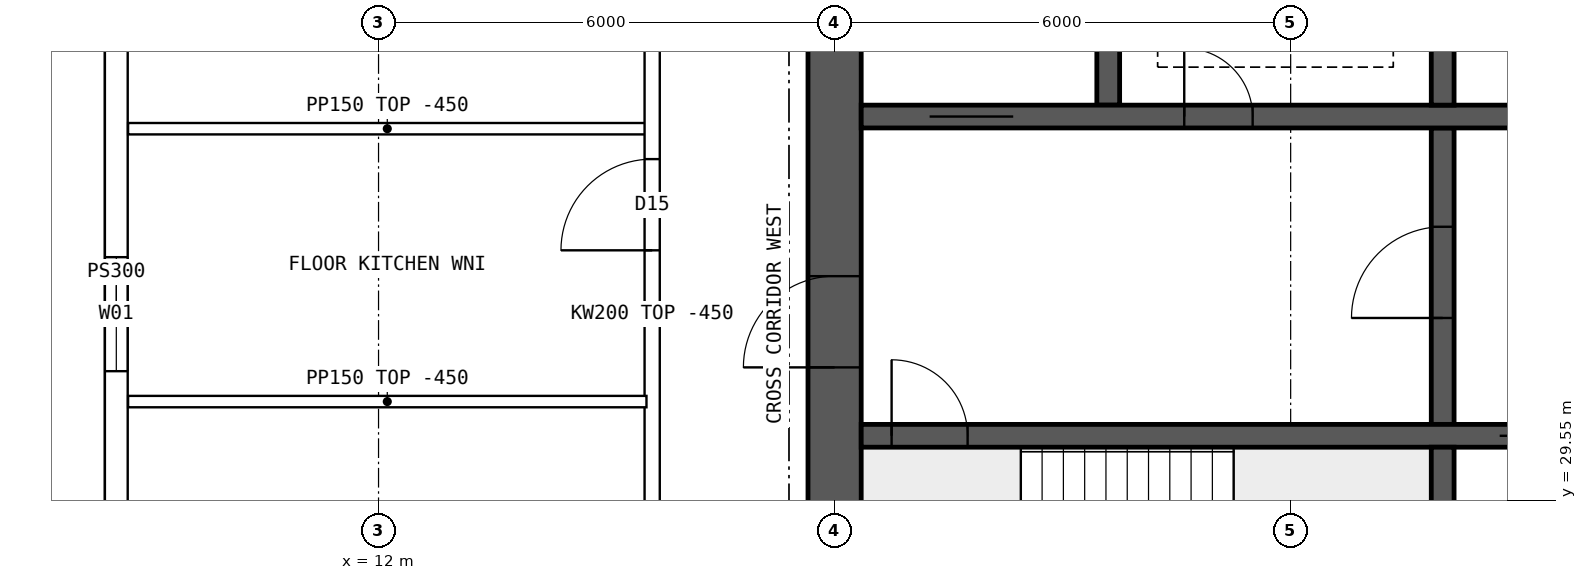
"""IFC4 building model, lengths in metres.
Left out: names, types, materials, properties, quantities, classifications, styles, units other than length and angle.
Written with IfcOpenShell. Run it as: python <this file> out.ifc"""

import sys

from ifc_helpers import new_model, si_unit, direction, frame, frame_2d, origin, place, context, subcontext, project, spatial, polyline, rectangle, outline, extrude, element, fill, save


model = new_model("IFC4")
c1 = context("Model", 3, precision=1e-05, world=origin(), true_north=direction((0.0, 1.0)))
c2 = subcontext(c1, "Body", "Model", "MODEL_VIEW")
j1 = project(units=[si_unit("LENGTHUNIT", "METRE"), si_unit("PLANEANGLEUNIT", "RADIAN")], contexts=[c1])
p1 = place(None, origin())
s1 = spatial("IfcSite", under=j1, at=p1, CompositionType="ELEMENT")
p2 = place(p1, origin())
s2 = spatial("IfcBuilding", under=s1, at=p2, CompositionType="ELEMENT")
p3 = place(p2, frame((0.0, 0.0, 242.8)))
s3 = spatial("IfcBuildingStorey", under=s2, at=p3, CompositionType="ELEMENT", Elevation=242.8)
p4 = place(p3, frame((18.0, 26.15, 0.0), z_axis=(0.0, 0.0, 1.0), x_axis=(0.0, 1.0, 0.0)))
e1 = element("IfcWall", 1, at=p4, inside=s3, PredefinedType="SHEAR", context=c2, shape_type="SweptSolid", body=[
    extrude(rectangle(XDim=11.7, YDim=0.7, at=frame_2d((5.85, 0.0))), origin(), (0.0, 0.0, 1.0), 3.75),
])
p5 = place(p4, frame((5.15, 0.0, 0.0)))
e2 = element("IfcOpeningElement", 2, at=p5, cuts=e1, PredefinedType="OPENING", context=c2, shape_type="SweptSolid", body=[
    extrude(rectangle(XDim=1.2, YDim=2.1, at=frame_2d((0.6, 1.05))), frame((0.0, 0.36, 0.0), z_axis=(0.0, -1.0, 0.0), x_axis=(1.0, 0.0, 0.0)), (0.0, 0.0, 1.0), 0.72),
])
p6 = place(p3, frame((18.35, 30.4, 0.0), z_axis=(0.0, 0.0, 1.0), x_axis=(1.0, 0.0, 0.0)))
e3 = element("IfcWall", 3, at=p6, inside=s3, PredefinedType="SHEAR", context=c2, shape_type="SweptSolid", body=[
    extrude(rectangle(XDim=47.3, YDim=0.3, at=frame_2d((23.65, 0.0))), origin(), (0.0, 0.0, 1.0), 3.75),
])
p7 = place(p6, frame((0.4, 0.0, 0.0)))
e4 = element("IfcOpeningElement", 4, at=p7, cuts=e3, PredefinedType="OPENING", context=c2, shape_type="SweptSolid", body=[
    extrude(rectangle(XDim=1.0, YDim=2.1, at=frame_2d((0.5, 1.05))), frame((0.0, 0.16, 0.0), z_axis=(0.0, -1.0, 0.0), x_axis=(1.0, 0.0, 0.0)), (0.0, 0.0, 1.0), 0.32),
])
p8 = place(p6, frame((45.9, 0.0, 0.0)))
e5 = element("IfcOpeningElement", 5, at=p8, cuts=e3, PredefinedType="OPENING", context=c2, shape_type="SweptSolid", body=[
    extrude(rectangle(XDim=1.0, YDim=2.1, at=frame_2d((0.5, 1.05))), frame((0.0, 0.16, 0.0), z_axis=(0.0, -1.0, 0.0), x_axis=(1.0, 0.0, 0.0)), (0.0, 0.0, 1.0), 0.32),
])
p9 = place(p6, frame((8.4, 0.0, 0.0)))
e6 = element("IfcOpeningElement", 6, at=p9, cuts=e3, PredefinedType="OPENING", context=c2, shape_type="SweptSolid", body=[
    extrude(rectangle(XDim=1.1, YDim=2.1, at=frame_2d((0.55, 1.05))), frame((0.0, 0.16, 0.0), z_axis=(0.0, -1.0, 0.0), x_axis=(1.0, 0.0, 0.0)), (0.0, 0.0, 1.0), 0.32),
])
p10 = place(p6, frame((11.0, 0.0, 0.0)))
e7 = element("IfcOpeningElement", 7, at=p10, cuts=e3, PredefinedType="OPENING", context=c2, shape_type="SweptSolid", body=[
    extrude(rectangle(XDim=1.1, YDim=2.1, at=frame_2d((0.55, 1.05))), frame((0.0, 0.16, 0.0), z_axis=(0.0, -1.0, 0.0), x_axis=(1.0, 0.0, 0.0)), (0.0, 0.0, 1.0), 0.32),
])
p11 = place(p6, frame((13.6, 0.0, 0.0)))
e8 = element("IfcOpeningElement", 8, at=p11, cuts=e3, PredefinedType="OPENING", context=c2, shape_type="SweptSolid", body=[
    extrude(rectangle(XDim=1.1, YDim=2.1, at=frame_2d((0.55, 1.05))), frame((0.0, 0.16, 0.0), z_axis=(0.0, -1.0, 0.0), x_axis=(1.0, 0.0, 0.0)), (0.0, 0.0, 1.0), 0.32),
])
p12 = place(p6, frame((16.2, 0.0, 0.0)))
e9 = element("IfcOpeningElement", 9, at=p12, cuts=e3, PredefinedType="OPENING", context=c2, shape_type="SweptSolid", body=[
    extrude(rectangle(XDim=1.1, YDim=2.1, at=frame_2d((0.55, 1.05))), frame((0.0, 0.16, 0.0), z_axis=(0.0, -1.0, 0.0), x_axis=(1.0, 0.0, 0.0)), (0.0, 0.0, 1.0), 0.32),
])
p13 = place(p6, frame((18.975, 0.0, 0.0)))
e10 = element("IfcOpeningElement", 10, at=p13, cuts=e3, PredefinedType="OPENING", context=c2, shape_type="SweptSolid", body=[
    extrude(rectangle(XDim=0.9, YDim=2.1, at=frame_2d((0.45, 1.05))), frame((0.0, 0.16, 0.0), z_axis=(0.0, -1.0, 0.0), x_axis=(1.0, 0.0, 0.0)), (0.0, 0.0, 1.0), 0.32),
])
p14 = place(p6, frame((24.475, 0.0, 0.0)))
e11 = element("IfcOpeningElement", 11, at=p14, cuts=e3, PredefinedType="OPENING", context=c2, shape_type="SweptSolid", body=[
    extrude(rectangle(XDim=0.9, YDim=2.1, at=frame_2d((0.45, 1.05))), frame((0.0, 0.16, 0.0), z_axis=(0.0, -1.0, 0.0), x_axis=(1.0, 0.0, 0.0)), (0.0, 0.0, 1.0), 0.32),
])
p15 = place(p6, frame((30.267, 0.0, 0.0)))
e12 = element("IfcOpeningElement", 12, at=p15, cuts=e3, PredefinedType="OPENING", context=c2, shape_type="SweptSolid", body=[
    extrude(rectangle(XDim=1.1, YDim=2.1, at=frame_2d((0.55, 1.05))), frame((0.0, 0.16, 0.0), z_axis=(0.0, -1.0, 0.0), x_axis=(1.0, 0.0, 0.0)), (0.0, 0.0, 1.0), 0.32),
])
p16 = place(p6, frame((33.8, 0.0, 0.0)))
e13 = element("IfcOpeningElement", 13, at=p16, cuts=e3, PredefinedType="OPENING", context=c2, shape_type="SweptSolid", body=[
    extrude(rectangle(XDim=1.1, YDim=2.1, at=frame_2d((0.55, 1.05))), frame((0.0, 0.16, 0.0), z_axis=(0.0, -1.0, 0.0), x_axis=(1.0, 0.0, 0.0)), (0.0, 0.0, 1.0), 0.32),
])
p17 = place(p6, frame((37.333, 0.0, 0.0)))
e14 = element("IfcOpeningElement", 14, at=p17, cuts=e3, PredefinedType="OPENING", context=c2, shape_type="SweptSolid", body=[
    extrude(rectangle(XDim=1.1, YDim=2.1, at=frame_2d((0.55, 1.05))), frame((0.0, 0.16, 0.0), z_axis=(0.0, -1.0, 0.0), x_axis=(1.0, 0.0, 0.0)), (0.0, 0.0, 1.0), 0.32),
])
p18 = place(p3, frame((18.35, 34.6, 0.0), z_axis=(0.0, 0.0, 1.0), x_axis=(1.0, 0.0, 0.0)))
e15 = element("IfcWall", 15, at=p18, inside=s3, PredefinedType="SHEAR", context=c2, shape_type="SweptSolid", body=[
    extrude(rectangle(XDim=47.3, YDim=0.3, at=frame_2d((23.65, 0.0))), origin(), (0.0, 0.0, 1.0), 3.75),
])
p19 = place(p18, frame((0.9, 0.0, 0.0)))
e16 = element("IfcOpeningElement", 16, at=p19, cuts=e15, PredefinedType="OPENING", context=c2, shape_type="SweptSolid", body=[
    extrude(rectangle(XDim=1.1, YDim=2.1, at=frame_2d((0.55, 1.05))), frame((0.0, 0.16, 0.0), z_axis=(0.0, -1.0, 0.0), x_axis=(1.0, 0.0, 0.0)), (0.0, 0.0, 1.0), 0.32),
])
p20 = place(p18, frame((45.3, 0.0, 0.0)))
e17 = element("IfcOpeningElement", 17, at=p20, cuts=e15, PredefinedType="OPENING", context=c2, shape_type="SweptSolid", body=[
    extrude(rectangle(XDim=1.1, YDim=2.1, at=frame_2d((0.55, 1.05))), frame((0.0, 0.16, 0.0), z_axis=(0.0, -1.0, 0.0), x_axis=(1.0, 0.0, 0.0)), (0.0, 0.0, 1.0), 0.32),
])
p21 = place(p18, frame((4.25, 0.0, 0.0)))
e18 = element("IfcOpeningElement", 18, at=p21, cuts=e15, PredefinedType="OPENING", context=c2, shape_type="SweptSolid", body=[
    extrude(rectangle(XDim=0.9, YDim=2.1, at=frame_2d((0.45, 1.05))), frame((0.0, 0.16, 0.0), z_axis=(0.0, -1.0, 0.0), x_axis=(1.0, 0.0, 0.0)), (0.0, 0.0, 1.0), 0.32),
])
p22 = place(p18, frame((42.15, 0.0, 0.0)))
e19 = element("IfcOpeningElement", 19, at=p22, cuts=e15, PredefinedType="OPENING", context=c2, shape_type="SweptSolid", body=[
    extrude(rectangle(XDim=0.9, YDim=2.1, at=frame_2d((0.45, 1.05))), frame((0.0, 0.16, 0.0), z_axis=(0.0, -1.0, 0.0), x_axis=(1.0, 0.0, 0.0)), (0.0, 0.0, 1.0), 0.32),
])
p23 = place(p18, frame((9.025, 0.0, 0.0)))
e20 = element("IfcOpeningElement", 20, at=p23, cuts=e15, PredefinedType="OPENING", context=c2, shape_type="SweptSolid", body=[
    extrude(rectangle(XDim=0.9, YDim=2.1, at=frame_2d((0.45, 1.05))), frame((0.0, 0.16, 0.0), z_axis=(0.0, -1.0, 0.0), x_axis=(1.0, 0.0, 0.0)), (0.0, 0.0, 1.0), 0.32),
])
p24 = place(p18, frame((12.999, 0.0, 0.0)))
e21 = element("IfcOpeningElement", 21, at=p24, cuts=e15, PredefinedType="OPENING", context=c2, shape_type="SweptSolid", body=[
    extrude(rectangle(XDim=0.9, YDim=2.1, at=frame_2d((0.45, 1.05))), frame((0.0, 0.16, 0.0), z_axis=(0.0, -1.0, 0.0), x_axis=(1.0, 0.0, 0.0)), (0.0, 0.0, 1.0), 0.32),
])
p25 = place(p18, frame((16.646, 0.0, 0.0)))
e22 = element("IfcOpeningElement", 22, at=p25, cuts=e15, PredefinedType="OPENING", context=c2, shape_type="SweptSolid", body=[
    extrude(rectangle(XDim=0.9, YDim=2.1, at=frame_2d((0.45, 1.05))), frame((0.0, 0.16, 0.0), z_axis=(0.0, -1.0, 0.0), x_axis=(1.0, 0.0, 0.0)), (0.0, 0.0, 1.0), 0.32),
])
p26 = place(p18, frame((20.405, 0.0, 0.0)))
e23 = element("IfcOpeningElement", 23, at=p26, cuts=e15, PredefinedType="OPENING", context=c2, shape_type="SweptSolid", body=[
    extrude(rectangle(XDim=0.9, YDim=2.1, at=frame_2d((0.45, 1.05))), frame((0.0, 0.16, 0.0), z_axis=(0.0, -1.0, 0.0), x_axis=(1.0, 0.0, 0.0)), (0.0, 0.0, 1.0), 0.32),
])
p27 = place(p18, frame((24.811, 0.0, 0.0)))
e24 = element("IfcOpeningElement", 24, at=p27, cuts=e15, PredefinedType="OPENING", context=c2, shape_type="SweptSolid", body=[
    extrude(rectangle(XDim=0.9, YDim=2.1, at=frame_2d((0.45, 1.05))), frame((0.0, 0.16, 0.0), z_axis=(0.0, -1.0, 0.0), x_axis=(1.0, 0.0, 0.0)), (0.0, 0.0, 1.0), 0.32),
])
p28 = place(p18, frame((27.608, 0.0, 0.0)))
e25 = element("IfcOpeningElement", 25, at=p28, cuts=e15, PredefinedType="OPENING", context=c2, shape_type="SweptSolid", body=[
    extrude(rectangle(XDim=0.9, YDim=2.1, at=frame_2d((0.45, 1.05))), frame((0.0, 0.16, 0.0), z_axis=(0.0, -1.0, 0.0), x_axis=(1.0, 0.0, 0.0)), (0.0, 0.0, 1.0), 0.32),
])
p29 = place(p18, frame((29.778, 0.0, 0.0)))
e26 = element("IfcOpeningElement", 26, at=p29, cuts=e15, PredefinedType="OPENING", context=c2, shape_type="SweptSolid", body=[
    extrude(rectangle(XDim=0.9, YDim=2.1, at=frame_2d((0.45, 1.05))), frame((0.0, 0.16, 0.0), z_axis=(0.0, -1.0, 0.0), x_axis=(1.0, 0.0, 0.0)), (0.0, 0.0, 1.0), 0.32),
])
p30 = place(p18, frame((33.577, 0.0, 0.0)))
e27 = element("IfcOpeningElement", 27, at=p30, cuts=e15, PredefinedType="OPENING", context=c2, shape_type="SweptSolid", body=[
    extrude(rectangle(XDim=0.9, YDim=2.1, at=frame_2d((0.45, 1.05))), frame((0.0, 0.16, 0.0), z_axis=(0.0, -1.0, 0.0), x_axis=(1.0, 0.0, 0.0)), (0.0, 0.0, 1.0), 0.32),
])
p31 = place(p18, frame((37.528, 0.0, 0.0)))
e28 = element("IfcOpeningElement", 28, at=p31, cuts=e15, PredefinedType="OPENING", context=c2, shape_type="SweptSolid", body=[
    extrude(rectangle(XDim=0.9, YDim=2.1, at=frame_2d((0.45, 1.05))), frame((0.0, 0.16, 0.0), z_axis=(0.0, -1.0, 0.0), x_axis=(1.0, 0.0, 0.0)), (0.0, 0.0, 1.0), 0.32),
])
p32 = place(p3, frame((26.0, 26.15, 0.0), z_axis=(0.0, 0.0, 1.0), x_axis=(0.0, 1.0, 0.0)))
e29 = element("IfcWall", 29, at=p32, inside=s3, PredefinedType="SHEAR", context=c2, shape_type="SweptSolid", body=[
    extrude(rectangle(XDim=4.1, YDim=0.3, at=frame_2d((2.05, 0.0))), origin(), (0.0, 0.0, 1.0), 3.75),
])
p33 = place(p3, frame((26.0, 30.55, 0.0), z_axis=(0.0, 0.0, 1.0), x_axis=(0.0, 1.0, 0.0)))
e30 = element("IfcWall", 30, at=p33, inside=s3, PredefinedType="SHEAR", context=c2, shape_type="SweptSolid", body=[
    extrude(rectangle(XDim=3.9, YDim=0.3, at=frame_2d((1.95, 0.0))), origin(), (0.0, 0.0, 1.0), 3.75),
])
p34 = place(p33, frame((1.4, 0.0, 0.0)))
e31 = element("IfcOpeningElement", 31, at=p34, cuts=e30, PredefinedType="OPENING", context=c2, shape_type="SweptSolid", body=[
    extrude(rectangle(XDim=1.2, YDim=2.1, at=frame_2d((0.6, 1.05))), frame((0.0, 0.16, 0.0), z_axis=(0.0, -1.0, 0.0), x_axis=(1.0, 0.0, 0.0)), (0.0, 0.0, 1.0), 0.32),
])
for number, where, z_axis, x_axis in (
    (32, (21.6, 34.75, 0.0), (0.0, 0.0, 1.0), (0.0, 1.0, 0.0)),
    (33, (26.0, 34.75, 0.0), (0.0, 0.0, 1.0), (0.0, 1.0, 0.0)),
):
    element("IfcWall", number, at=place(p3, frame(where, z_axis=z_axis, x_axis=x_axis)), inside=s3, PredefinedType="SHEAR", context=c2, shape_type="SweptSolid", body=[
        extrude(rectangle(XDim=3.1, YDim=0.3, at=frame_2d((1.55, 0.0))), origin(), (0.0, 0.0, 1.0), 3.75),
    ])
p35 = place(p3, frame((8.55, 44.2, 0.0), z_axis=(0.0, 0.0, 1.0), x_axis=(0.0, -1.0, 0.0)))
e34 = element("IfcWall", 34, at=p35, inside=s3, PredefinedType="SOLIDWALL", context=c2, shape_type="SweptSolid", body=[
    extrude(outline(polyline([(-0.015, -0.15), (24.415, -0.15), (24.385, 0.15), (0.015, 0.15), (-0.015, -0.15)])), origin(), (0.0, 0.0, 1.0), 3.3),
])
p36 = place(p35, frame((1.69, 0.0, 0.9)))
e35 = element("IfcOpeningElement", 35, at=p36, cuts=e34, PredefinedType="OPENING", context=c2, shape_type="SweptSolid", body=[
    extrude(rectangle(XDim=1.5, YDim=2.0, at=frame_2d((0.75, 1.0))), frame((0.0, 0.16, 0.0), z_axis=(0.0, -1.0, 0.0), x_axis=(1.0, 0.0, 0.0)), (0.0, 0.0, 1.0), 0.32),
])
p37 = place(p35, frame((6.57, 0.0, 0.9)))
e36 = element("IfcOpeningElement", 36, at=p37, cuts=e34, PredefinedType="OPENING", context=c2, shape_type="SweptSolid", body=[
    extrude(rectangle(XDim=1.5, YDim=2.0, at=frame_2d((0.75, 1.0))), frame((0.0, 0.16, 0.0), z_axis=(0.0, -1.0, 0.0), x_axis=(1.0, 0.0, 0.0)), (0.0, 0.0, 1.0), 0.32),
])
p38 = place(p35, frame((11.45, 0.0, 0.9)))
e37 = element("IfcOpeningElement", 37, at=p38, cuts=e34, PredefinedType="OPENING", context=c2, shape_type="SweptSolid", body=[
    extrude(rectangle(XDim=1.5, YDim=2.0, at=frame_2d((0.75, 1.0))), frame((0.0, 0.16, 0.0), z_axis=(0.0, -1.0, 0.0), x_axis=(1.0, 0.0, 0.0)), (0.0, 0.0, 1.0), 0.32),
])
p39 = place(p35, frame((16.33, 0.0, 0.9)))
e38 = element("IfcOpeningElement", 38, at=p39, cuts=e34, PredefinedType="OPENING", context=c2, shape_type="SweptSolid", body=[
    extrude(rectangle(XDim=1.5, YDim=2.0, at=frame_2d((0.75, 1.0))), frame((0.0, 0.16, 0.0), z_axis=(0.0, -1.0, 0.0), x_axis=(1.0, 0.0, 0.0)), (0.0, 0.0, 1.0), 0.32),
])
p40 = place(p35, frame((21.21, 0.0, 0.9)))
e39 = element("IfcOpeningElement", 39, at=p40, cuts=e34, PredefinedType="OPENING", context=c2, shape_type="SweptSolid", body=[
    extrude(rectangle(XDim=1.5, YDim=2.0, at=frame_2d((0.75, 1.0))), frame((0.0, 0.16, 0.0), z_axis=(0.0, -1.0, 0.0), x_axis=(1.0, 0.0, 0.0)), (0.0, 0.0, 1.0), 0.32),
])
p41 = place(p3, frame((8.705, 30.85, 0.0), z_axis=(0.0, 0.0, 1.0), x_axis=(1.0, 0.0, 0.0)))
e40 = element("IfcWall", 40, at=p41, inside=s3, PredefinedType="PARTITIONING", context=c2, shape_type="SweptSolid", body=[
    extrude(outline(polyline([(0.0, 0.0), (6.82, 0.0), (6.82, 3.3), (3.597, 3.3), (3.595, 2.85), (2.997, 2.85), (2.995, 3.3), (0.0, 3.3), (0.0, 0.0)])), frame((0.0, 0.075, 0.0), z_axis=(0.0, -1.0, 0.0), x_axis=(1.0, 0.0, 0.0)), (0.0, 0.0, 1.0), 0.15),
])
p42 = place(p3, frame((15.6, 11.646, 0.0), z_axis=(0.0, 0.0, 1.0), x_axis=(0.0, 1.0, 0.0)))
e41 = element("IfcWall", 41, at=p42, inside=s3, PredefinedType="SOLIDWALL", context=c2, shape_type="SweptSolid", body=[
    extrude(rectangle(XDim=40.708, YDim=0.2, at=frame_2d((20.354, 0.0))), origin(), (0.0, 0.0, 1.0), 3.3),
])
p43 = place(p42, frame((21.194, 0.0, 0.0)))
e42 = element("IfcOpeningElement", 42, at=p43, cuts=e41, PredefinedType="OPENING", context=c2, shape_type="SweptSolid", body=[
    extrude(rectangle(XDim=1.2, YDim=2.1, at=frame_2d((0.6, 1.05))), frame((0.0, 0.11, 0.0), z_axis=(0.0, -1.0, 0.0), x_axis=(1.0, 0.0, 0.0)), (0.0, 0.0, 1.0), 0.22),
])
p44 = place(p42, frame((5.104, 0.0, 0.0)))
e43 = element("IfcOpeningElement", 43, at=p44, cuts=e41, PredefinedType="OPENING", context=c2, shape_type="SweptSolid", body=[
    extrude(rectangle(XDim=1.4, YDim=2.1, at=frame_2d((0.7, 1.05))), frame((0.0, 0.11, 0.0), z_axis=(0.0, -1.0, 0.0), x_axis=(1.0, 0.0, 0.0)), (0.0, 0.0, 1.0), 0.22),
])
p45 = place(p42, frame((34.104, 0.0, 0.0)))
e44 = element("IfcOpeningElement", 44, at=p45, cuts=e41, PredefinedType="OPENING", context=c2, shape_type="SweptSolid", body=[
    extrude(rectangle(XDim=1.4, YDim=2.1, at=frame_2d((0.7, 1.05))), frame((0.0, 0.11, 0.0), z_axis=(0.0, -1.0, 0.0), x_axis=(1.0, 0.0, 0.0)), (0.0, 0.0, 1.0), 0.22),
])
p46 = place(p3, frame((8.705, 34.44, 0.0), z_axis=(0.0, 0.0, 1.0), x_axis=(1.0, 0.0, 0.0)))
e45 = element("IfcWall", 45, at=p46, inside=s3, PredefinedType="PARTITIONING", context=c2, shape_type="SweptSolid", body=[
    extrude(outline(polyline([(0.0, 0.0), (6.82, 0.0), (6.82, 3.3), (3.597, 3.3), (3.595, 2.85), (2.997, 2.85), (2.995, 3.3), (0.0, 3.3), (0.0, 0.0)])), frame((0.0, 0.075, 0.0), z_axis=(0.0, -1.0, 0.0), x_axis=(1.0, 0.0, 0.0)), (0.0, 0.0, 1.0), 0.15),
])
p47 = place(p38, origin())
e46 = element("IfcWindow", 46, at=p47, inside=s3, PartitioningType="SINGLE_PANEL", PredefinedType="WINDOW", context=c2, shape_type="SweptSolid", body=[
    extrude(rectangle(XDim=1.5, YDim=2.0, at=frame_2d((0.75, 1.0))), frame((0.0, 0.03, 0.0), z_axis=(0.0, -1.0, 0.0), x_axis=(1.0, 0.0, 0.0)), (0.0, 0.0, 1.0), 0.06),
])
fill(e37, e46)
p48 = place(p5, origin())
e47 = element("IfcDoor", 47, at=p48, inside=s3, OperationType="SINGLE_SWING_LEFT", PredefinedType="DOOR", context=c2, shape_type="SweptSolid", body=[
    extrude(rectangle(XDim=1.2, YDim=2.1, at=frame_2d((0.6, 1.05))), frame((0.0, 0.025, 0.0), z_axis=(0.0, -1.0, 0.0), x_axis=(1.0, 0.0, 0.0)), (0.0, 0.0, 1.0), 0.05),
])
fill(e2, e47)
p49 = place(p7, origin())
e48 = element("IfcDoor", 48, at=p49, inside=s3, OperationType="SINGLE_SWING_LEFT", PredefinedType="DOOR", context=c2, shape_type="SweptSolid", body=[
    extrude(rectangle(XDim=1.0, YDim=2.1, at=frame_2d((0.5, 1.05))), frame((0.0, 0.025, 0.0), z_axis=(0.0, -1.0, 0.0), x_axis=(1.0, 0.0, 0.0)), (0.0, 0.0, 1.0), 0.05),
])
fill(e4, e48)
p50 = place(p19, origin())
e49 = element("IfcDoor", 49, at=p50, inside=s3, OperationType="DOUBLE_DOOR_SLIDING", PredefinedType="DOOR", context=c2, shape_type="SweptSolid", body=[
    extrude(rectangle(XDim=1.1, YDim=2.1, at=frame_2d((0.55, 1.05))), frame((0.0, 0.025, 0.0), z_axis=(0.0, -1.0, 0.0), x_axis=(1.0, 0.0, 0.0)), (0.0, 0.0, 1.0), 0.05),
])
fill(e16, e49)
p51 = place(p21, origin())
e50 = element("IfcDoor", 50, at=p51, inside=s3, OperationType="SINGLE_SWING_LEFT", PredefinedType="DOOR", context=c2, shape_type="SweptSolid", body=[
    extrude(rectangle(XDim=0.9, YDim=2.1, at=frame_2d((0.45, 1.05))), frame((0.0, 0.025, 0.0), z_axis=(0.0, -1.0, 0.0), x_axis=(1.0, 0.0, 0.0)), (0.0, 0.0, 1.0), 0.05),
])
fill(e18, e50)
p52 = place(p34, origin())
e51 = element("IfcDoor", 51, at=p52, inside=s3, OperationType="SINGLE_SWING_LEFT", PredefinedType="DOOR", context=c2, shape_type="SweptSolid", body=[
    extrude(rectangle(XDim=1.2, YDim=2.1, at=frame_2d((0.6, 1.05))), frame((0.0, 0.025, 0.0), z_axis=(0.0, -1.0, 0.0), x_axis=(1.0, 0.0, 0.0)), (0.0, 0.0, 1.0), 0.05),
])
fill(e31, e51)
p53 = place(p9, origin())
e52 = element("IfcDoor", 52, at=p53, inside=s3, OperationType="DOUBLE_DOOR_SLIDING", PredefinedType="DOOR", context=c2, shape_type="SweptSolid", body=[
    extrude(rectangle(XDim=1.1, YDim=2.1, at=frame_2d((0.55, 1.05))), frame((0.0, 0.025, 0.0), z_axis=(0.0, -1.0, 0.0), x_axis=(1.0, 0.0, 0.0)), (0.0, 0.0, 1.0), 0.05),
])
fill(e6, e52)
p54 = place(p43, origin())
e53 = element("IfcDoor", 53, at=p54, inside=s3, OperationType="SINGLE_SWING_LEFT", PredefinedType="DOOR", context=c2, shape_type="SweptSolid", body=[
    extrude(rectangle(XDim=1.2, YDim=2.1, at=frame_2d((0.6, 1.05))), frame((0.0, 0.025, 0.0), z_axis=(0.0, -1.0, 0.0), x_axis=(1.0, 0.0, 0.0)), (0.0, 0.0, 1.0), 0.05),
])
fill(e42, e53)
save(model, sys.argv[1])
